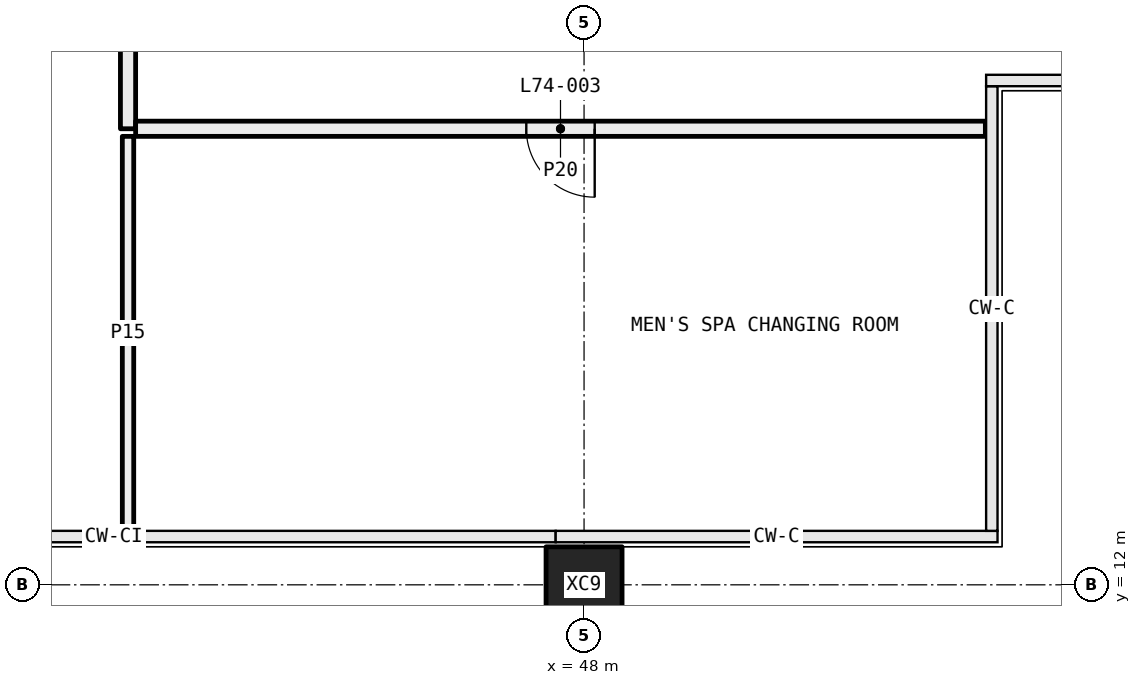
"""IFC4 building model, lengths in metres.
Left out: names, types, materials, properties, quantities, classifications, styles, units other than length and angle.
Written with IfcOpenShell. Run it as: python <this file> out.ifc"""

import sys

from ifc_helpers import new_model, si_unit, direction, frame, frame_2d, origin, origin_2d, place, context, subcontext, project, spatial, rectangle, hollow_rectangle, extrude, element, fill, save


model = new_model("IFC4")
c1 = context("Model", 3, precision=1e-05, world=origin(), true_north=direction((0.0, 1.0)))
c2 = subcontext(c1, "Body", "Model", "MODEL_VIEW")
j1 = project(units=[si_unit("LENGTHUNIT", "METRE"), si_unit("PLANEANGLEUNIT", "RADIAN")], contexts=[c1])
p1 = place(None, origin())
s1 = spatial("IfcSite", under=j1, at=p1, CompositionType="ELEMENT")
p2 = place(p1, origin())
s2 = spatial("IfcBuilding", under=s1, at=p2, CompositionType="ELEMENT")
p3 = place(p2, frame((0.0, 0.0, 273.15)))
s3 = spatial("IfcBuildingStorey", under=s2, at=p3, CompositionType="ELEMENT", Elevation=273.15)
p4 = place(p3, frame((48.0, 12.0, -0.4), z_axis=(0.0, 0.0, 1.0), x_axis=(1.0, 0.0, 0.0)))
e1 = element("IfcColumn", 1, at=p4, inside=s3, PredefinedType="COLUMN", context=c2, shape_type="SweptSolid", body=[
    extrude(hollow_rectangle(XDim=1.0, YDim=1.0, WallThickness=0.036, at=origin_2d()), origin(), (0.0, 0.0, 1.0), 4.8),
])
p5 = place(p3, frame((42.0, 21.5, 0.0), z_axis=(0.0, 0.0, 1.0), x_axis=(0.0, -1.0, 0.0)))
e2 = element("IfcWall", 2, at=p5, inside=s3, PredefinedType="PARTITIONING", context=c2, shape_type="SweptSolid", body=[
    extrude(rectangle(XDim=3.5, YDim=0.2, at=frame_2d((1.75, 0.0))), origin(), (0.0, 0.0, 1.0), 4.4),
])
p6 = place(p3, frame((42.1, 18.0, 0.0), z_axis=(0.0, 0.0, 1.0), x_axis=(1.0, 0.0, 0.0)))
e3 = element("IfcWall", 3, at=p6, inside=s3, PredefinedType="PARTITIONING", context=c2, shape_type="SweptSolid", body=[
    extrude(rectangle(XDim=11.18, YDim=0.2, at=frame_2d((5.59, 0.0))), origin(), (0.0, 0.0, 1.0), 4.4),
])
p7 = place(p6, frame((5.14, 0.0, 0.0)))
e4 = element("IfcOpeningElement", 4, at=p7, cuts=e3, PredefinedType="OPENING", context=c2, shape_type="SweptSolid", body=[
    extrude(rectangle(XDim=0.9, YDim=2.1, at=frame_2d((0.45, 1.05))), frame((0.0, 0.11, 0.0), z_axis=(0.0, -1.0, 0.0), x_axis=(1.0, 0.0, 0.0)), (0.0, 0.0, 1.0), 0.22),
])
p8 = place(p3, frame((42.0, 12.72, 0.0), z_axis=(0.0, 0.0, 1.0), x_axis=(0.0, 1.0, 0.0)))
e5 = element("IfcWall", 5, at=p8, inside=s3, PredefinedType="PARTITIONING", context=c2, shape_type="SweptSolid", body=[
    extrude(rectangle(XDim=5.18, YDim=0.15, at=frame_2d((2.59, 0.0))), origin(), (0.0, 0.0, 1.0), 4.4),
])
p9 = place(p7, frame((0.9, 0.0, 0.0), x_axis=(-1.0, 0.0, 0.0)))
e6 = element("IfcDoor", 6, at=p9, inside=s3, OperationType="SINGLE_SWING_RIGHT", PredefinedType="DOOR", context=c2, shape_type="SweptSolid", body=[
    extrude(rectangle(XDim=0.9, YDim=2.1, at=frame_2d((0.45, 1.05))), frame((0.0, 0.025, 0.0), z_axis=(0.0, -1.0, 0.0), x_axis=(1.0, 0.0, 0.0)), (0.0, 0.0, 1.0), 0.05),
])
fill(e4, e6)
save(model, sys.argv[1])
